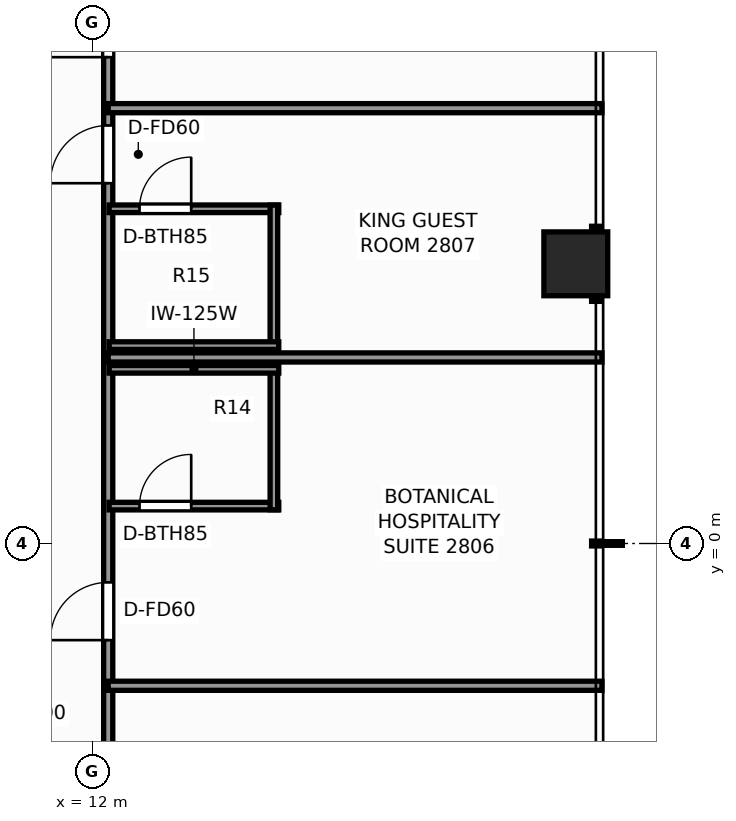
"""IFC4 building model, lengths in metres.
Left out: names, types, materials, properties, quantities, classifications, styles, units other than length and angle.
Written with IfcOpenShell. Run it as: python <this file> out.ifc"""

import sys

from ifc_helpers import new_model, si_unit, direction, frame, frame_2d, origin, origin_2d, place, context, subcontext, project, spatial, rectangle, extrude, element, fill, save


model = new_model("IFC4")
c1 = context("Model", 3, precision=1e-05, world=origin(), true_north=direction((0.0, 1.0)))
c2 = subcontext(c1, "Body", "Model", "MODEL_VIEW")
j1 = project(units=[si_unit("LENGTHUNIT", "METRE"), si_unit("PLANEANGLEUNIT", "RADIAN")], contexts=[c1])
p1 = place(None, origin())
s1 = spatial("IfcSite", under=j1, at=p1, CompositionType="ELEMENT")
p2 = place(p1, origin())
s2 = spatial("IfcBuilding", under=s1, at=p2, CompositionType="ELEMENT")
p3 = place(p2, frame((0.0, 0.0, 98.6)))
s3 = spatial("IfcBuildingStorey", under=s2, at=p3, CompositionType="ELEMENT", Elevation=98.6)
p4 = place(p3, frame((19.95, 4.6, 0.0), z_axis=(0.0, 0.0, 1.0), x_axis=(1.0, 0.0, 0.0)))
e1 = element("IfcColumn", 1, at=p4, inside=s3, PredefinedType="COLUMN", context=c2, shape_type="SweptSolid", body=[
    extrude(rectangle(XDim=1.05, YDim=1.05, at=origin_2d()), origin(), (0.0, 0.0, 1.0), 3.3),
])
p5 = place(p3, frame((12.26, -12.26, 0.0), z_axis=(0.0, 0.0, 1.0), x_axis=(0.0, 1.0, 0.0)))
e2 = element("IfcWall", 2, at=p5, inside=s3, PredefinedType="PARTITIONING", context=c2, shape_type="SweptSolid", body=[
    extrude(rectangle(XDim=24.84, YDim=0.15, at=frame_2d((12.42, 0.0))), origin(), (0.0, 0.0, 1.0), 2.292),
])
p6 = place(p5, frame((2.944, 0.0, 0.0)))
e3 = element("IfcOpeningElement", 3, at=p6, cuts=e2, PredefinedType="OPENING", context=c2, shape_type="SweptSolid", body=[
    extrude(rectangle(XDim=0.9, YDim=2.06, at=frame_2d((0.45, 1.03))), frame((0.0, 0.085, 0.0), z_axis=(0.0, -1.0, 0.0), x_axis=(1.0, 0.0, 0.0)), (0.0, 0.0, 1.0), 0.17),
])
p7 = place(p5, frame((5.279, 0.0, 0.0)))
e4 = element("IfcOpeningElement", 4, at=p7, cuts=e2, PredefinedType="OPENING", context=c2, shape_type="SweptSolid", body=[
    extrude(rectangle(XDim=0.9, YDim=2.06, at=frame_2d((0.45, 1.03))), frame((0.0, 0.085, 0.0), z_axis=(0.0, -1.0, 0.0), x_axis=(1.0, 0.0, 0.0)), (0.0, 0.0, 1.0), 0.17),
])
p8 = place(p5, frame((10.671, 0.0, 0.0)))
e5 = element("IfcOpeningElement", 5, at=p8, cuts=e2, PredefinedType="OPENING", context=c2, shape_type="SweptSolid", body=[
    extrude(rectangle(XDim=0.95, YDim=2.06, at=frame_2d((0.475, 1.03))), frame((0.0, 0.085, 0.0), z_axis=(0.0, -1.0, 0.0), x_axis=(1.0, 0.0, 0.0)), (0.0, 0.0, 1.0), 0.17),
])
p9 = place(p5, frame((18.186, 0.0, 0.0)))
e6 = element("IfcOpeningElement", 6, at=p9, cuts=e2, PredefinedType="OPENING", context=c2, shape_type="SweptSolid", body=[
    extrude(rectangle(XDim=0.95, YDim=2.06, at=frame_2d((0.475, 1.03))), frame((0.0, 0.085, 0.0), z_axis=(0.0, -1.0, 0.0), x_axis=(1.0, 0.0, 0.0)), (0.0, 0.0, 1.0), 0.17),
])
p10 = place(p5, frame((20.259, 0.0, 0.0)))
e7 = element("IfcOpeningElement", 7, at=p10, cuts=e2, PredefinedType="OPENING", context=c2, shape_type="SweptSolid", body=[
    extrude(rectangle(XDim=0.95, YDim=2.06, at=frame_2d((0.475, 1.03))), frame((0.0, 0.085, 0.0), z_axis=(0.0, -1.0, 0.0), x_axis=(1.0, 0.0, 0.0)), (0.0, 0.0, 1.0), 0.17),
])
p11 = place(p3, frame((12.26, -2.34, 0.0), z_axis=(0.0, 0.0, 1.0), x_axis=(1.0, 0.0, 0.0)))
e8 = element("IfcWall", 8, at=p11, inside=s3, PredefinedType="PARTITIONING", context=c2, shape_type="SweptSolid", body=[
    extrude(rectangle(XDim=8.12, YDim=0.15, at=frame_2d((4.06, 0.0))), origin(), (0.0, 0.0, 1.0), 2.449),
])
p12 = place(p3, frame((12.26, 3.06, 0.0), z_axis=(0.0, 0.0, 1.0), x_axis=(1.0, 0.0, 0.0)))
e9 = element("IfcWall", 9, at=p12, inside=s3, PredefinedType="PARTITIONING", context=c2, shape_type="SweptSolid", body=[
    extrude(rectangle(XDim=8.12, YDim=0.15, at=frame_2d((4.06, 0.0))), origin(), (0.0, 0.0, 1.0), 2.369),
])
p13 = place(p3, frame((12.275, 0.615, 0.0), z_axis=(0.0, 0.0, 1.0), x_axis=(1.0, 0.0, 0.0)))
e10 = element("IfcWall", 10, at=p13, inside=s3, PredefinedType="PARTITIONING", context=c2, shape_type="SweptSolid", body=[
    extrude(rectangle(XDim=2.79, YDim=0.125, at=frame_2d((1.395, 0.0))), origin(), (0.0, 0.0, 1.0), 3.08),
])
p14 = place(p13, frame((0.5, 0.0, 0.0)))
e11 = element("IfcOpeningElement", 11, at=p14, cuts=e10, PredefinedType="OPENING", context=c2, shape_type="SweptSolid", body=[
    extrude(rectangle(XDim=0.85, YDim=2.03, at=frame_2d((0.425, 1.015))), frame((0.0, 0.073, 0.0), z_axis=(0.0, -1.0, 0.0), x_axis=(1.0, 0.0, 0.0)), (0.0, 0.0, 1.0), 0.145),
])
p15 = place(p3, frame((14.985, 0.555, 0.0), z_axis=(0.0, 0.0, 1.0), x_axis=(0.0, 1.0, 0.0)))
e12 = element("IfcWall", 12, at=p15, inside=s3, PredefinedType="PARTITIONING", context=c2, shape_type="SweptSolid", body=[
    extrude(rectangle(XDim=2.37, YDim=0.125, at=frame_2d((1.185, 0.0))), origin(), (0.0, 0.0, 1.0), 2.369),
])
p16 = place(p3, frame((12.275, 2.865, 0.0), z_axis=(0.0, 0.0, 1.0), x_axis=(1.0, 0.0, 0.0)))
e13 = element("IfcWall", 13, at=p16, inside=s3, PredefinedType="PARTITIONING", context=c2, shape_type="SweptSolid", body=[
    extrude(rectangle(XDim=2.79, YDim=0.125, at=frame_2d((1.395, 0.0))), origin(), (0.0, 0.0, 1.0), 2.369),
])
p17 = place(p3, frame((12.26, 7.16, 0.0), z_axis=(0.0, 0.0, 1.0), x_axis=(1.0, 0.0, 0.0)))
e14 = element("IfcWall", 14, at=p17, inside=s3, PredefinedType="PARTITIONING", context=c2, shape_type="SweptSolid", body=[
    extrude(rectangle(XDim=8.12, YDim=0.15, at=frame_2d((4.06, 0.0))), origin(), (0.0, 0.0, 1.0), 2.449),
])
p18 = place(p3, frame((12.275, 5.505, 0.0), z_axis=(0.0, 0.0, 1.0), x_axis=(1.0, 0.0, 0.0)))
e15 = element("IfcWall", 15, at=p18, inside=s3, PredefinedType="PARTITIONING", context=c2, shape_type="SweptSolid", body=[
    extrude(rectangle(XDim=2.79, YDim=0.125, at=frame_2d((1.395, 0.0))), origin(), (0.0, 0.0, 1.0), 3.08),
])
p19 = place(p18, frame((0.5, 0.0, 0.0)))
e16 = element("IfcOpeningElement", 16, at=p19, cuts=e15, PredefinedType="OPENING", context=c2, shape_type="SweptSolid", body=[
    extrude(rectangle(XDim=0.85, YDim=2.03, at=frame_2d((0.425, 1.015))), frame((0.0, 0.073, 0.0), z_axis=(0.0, -1.0, 0.0), x_axis=(1.0, 0.0, 0.0)), (0.0, 0.0, 1.0), 0.145),
])
p20 = place(p3, frame((14.985, 3.195, 0.0), z_axis=(0.0, 0.0, 1.0), x_axis=(0.0, 1.0, 0.0)))
e17 = element("IfcWall", 17, at=p20, inside=s3, PredefinedType="PARTITIONING", context=c2, shape_type="SweptSolid", body=[
    extrude(rectangle(XDim=2.37, YDim=0.125, at=frame_2d((1.185, 0.0))), origin(), (0.0, 0.0, 1.0), 2.292),
])
p21 = place(p3, frame((12.275, 3.255, 0.0), z_axis=(0.0, 0.0, 1.0), x_axis=(1.0, 0.0, 0.0)))
e18 = element("IfcWall", 18, at=p21, inside=s3, PredefinedType="PARTITIONING", context=c2, shape_type="SweptSolid", body=[
    extrude(rectangle(XDim=2.79, YDim=0.125, at=frame_2d((1.395, 0.0))), origin(), (0.0, 0.0, 1.0), 2.369),
])
p22 = place(p14, origin())
e19 = element("IfcDoor", 19, at=p22, inside=s3, OperationType="SINGLE_SWING_RIGHT", PredefinedType="DOOR", context=c2, shape_type="SweptSolid", body=[
    extrude(rectangle(XDim=0.85, YDim=2.03, at=frame_2d((0.425, 1.015))), frame((0.0, 0.025, 0.0), z_axis=(0.0, -1.0, 0.0), x_axis=(1.0, 0.0, 0.0)), (0.0, 0.0, 1.0), 0.05),
])
fill(e11, e19)
p23 = place(p8, origin())
e20 = element("IfcDoor", 20, at=p23, inside=s3, OperationType="SINGLE_SWING_LEFT", PredefinedType="DOOR", context=c2, shape_type="SweptSolid", body=[
    extrude(rectangle(XDim=0.95, YDim=2.06, at=frame_2d((0.475, 1.03))), frame((0.0, 0.025, 0.0), z_axis=(0.0, -1.0, 0.0), x_axis=(1.0, 0.0, 0.0)), (0.0, 0.0, 1.0), 0.05),
])
fill(e5, e20)
p24 = place(p19, origin())
e21 = element("IfcDoor", 21, at=p24, inside=s3, OperationType="SINGLE_SWING_RIGHT", PredefinedType="DOOR", context=c2, shape_type="SweptSolid", body=[
    extrude(rectangle(XDim=0.85, YDim=2.03, at=frame_2d((0.425, 1.015))), frame((0.0, 0.025, 0.0), z_axis=(0.0, -1.0, 0.0), x_axis=(1.0, 0.0, 0.0)), (0.0, 0.0, 1.0), 0.05),
])
fill(e16, e21)
p25 = place(p9, origin())
e22 = element("IfcDoor", 22, at=p25, inside=s3, OperationType="SINGLE_SWING_LEFT", PredefinedType="DOOR", context=c2, shape_type="SweptSolid", body=[
    extrude(rectangle(XDim=0.95, YDim=2.06, at=frame_2d((0.475, 1.03))), frame((0.0, 0.025, 0.0), z_axis=(0.0, -1.0, 0.0), x_axis=(1.0, 0.0, 0.0)), (0.0, 0.0, 1.0), 0.05),
])
fill(e6, e22)
p26 = place(p10, origin())
e23 = element("IfcDoor", 23, at=p26, inside=s3, OperationType="SINGLE_SWING_LEFT", PredefinedType="DOOR", context=c2, shape_type="SweptSolid", body=[
    extrude(rectangle(XDim=0.95, YDim=2.06, at=frame_2d((0.475, 1.03))), frame((0.0, 0.025, 0.0), z_axis=(0.0, -1.0, 0.0), x_axis=(1.0, 0.0, 0.0)), (0.0, 0.0, 1.0), 0.05),
])
fill(e7, e23)
save(model, sys.argv[1])
